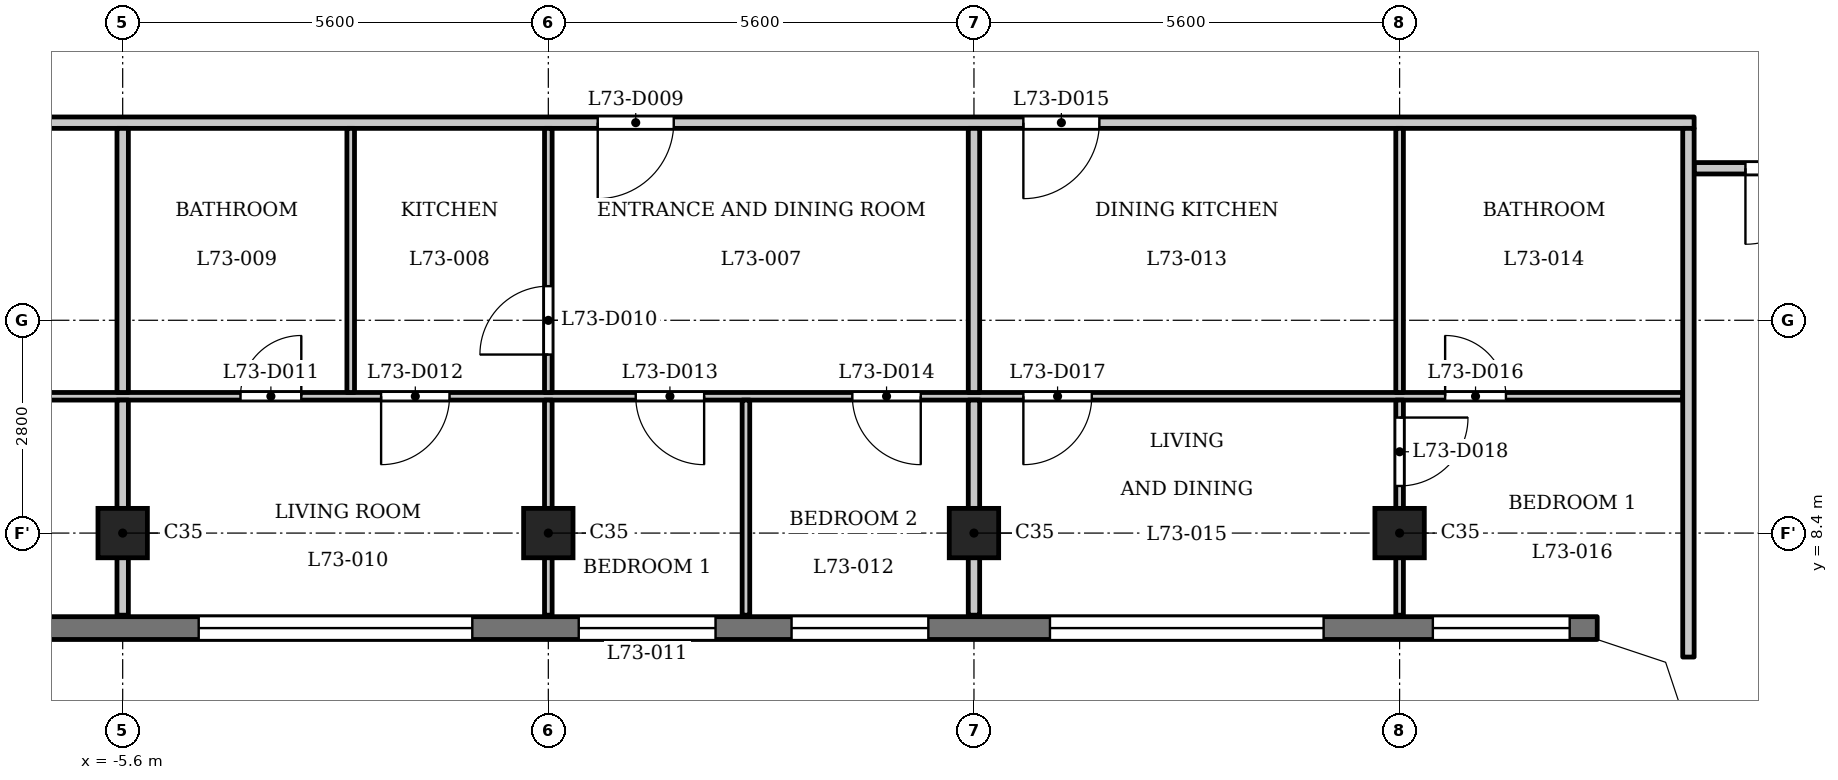
"""IFC4 building model, lengths in metres.
Left out: names, types, materials, properties, quantities, classifications, styles, units other than length and angle.
Written with IfcOpenShell. Run it as: python <this file> out.ifc"""

import sys

from ifc_helpers import new_model, si_unit, direction, frame, frame_2d, origin, origin_2d, place, context, subcontext, project, spatial, polyline, rectangle, outline, extrude, element, fill, save


model = new_model("IFC4")
c1 = context("Model", 3, precision=1e-05, world=origin(), true_north=direction((0.0, 1.0)))
c2 = subcontext(c1, "Body", "Model", "MODEL_VIEW")
j1 = project(units=[si_unit("LENGTHUNIT", "METRE"), si_unit("PLANEANGLEUNIT", "RADIAN")], contexts=[c1])
p1 = place(None, origin())
s1 = spatial("IfcSite", under=j1, at=p1, CompositionType="ELEMENT")
p2 = place(p1, origin())
s2 = spatial("IfcBuilding", under=s1, at=p2, CompositionType="ELEMENT")
p3 = place(p2, frame((0.0, 0.0, 280.2)))
s3 = spatial("IfcBuildingStorey", under=s2, at=p3, CompositionType="ELEMENT", Elevation=280.2)
for number, where, z_axis, x_axis in (
    (1, (-5.6, 8.4, 0.0), (0.0, 0.0, 1.0), (1.0, 0.0, 0.0)),
    (2, (0.0, 8.4, 0.0), (0.0, 0.0, 1.0), (1.0, 0.0, 0.0)),
    (3, (5.6, 8.4, 0.0), (0.0, 0.0, 1.0), (1.0, 0.0, 0.0)),
    (4, (11.2, 8.4, 0.0), (0.0, 0.0, 1.0), (1.0, 0.0, 0.0)),
):
    element("IfcColumn", number, at=place(p3, frame(where, z_axis=z_axis, x_axis=x_axis)), inside=s3, PredefinedType="COLUMN", context=c2, shape_type="SweptSolid", body=[
        extrude(rectangle(XDim=0.65, YDim=0.65, at=origin_2d()), origin(), (0.0, 0.0, 1.0), 3.5),
    ])
p4 = place(p3, frame((-13.8, 7.15, 0.0), z_axis=(0.0, 0.0, 1.0), x_axis=(1.0, 0.0, 0.0)))
e5 = element("IfcWall", 5, at=p4, inside=s3, PredefinedType="SOLIDWALL", context=c2, shape_type="SweptSolid", body=[
    extrude(rectangle(XDim=27.6, YDim=0.3, at=frame_2d((13.8, 0.0))), origin(), (0.0, 0.0, 1.0), 3.15),
])
p5 = place(p4, frame((0.363, 0.0, 0.9)))
e6 = element("IfcOpeningElement", 6, at=p5, cuts=e5, PredefinedType="OPENING", context=c2, shape_type="SweptSolid", body=[
    extrude(rectangle(XDim=1.8, YDim=1.25, at=frame_2d((0.9, 0.625))), frame((0.0, 0.16, 0.0), z_axis=(0.0, -1.0, 0.0), x_axis=(1.0, 0.0, 0.0)), (0.0, 0.0, 1.0), 0.32),
])
p6 = place(p4, frame((3.6, 0.0, 1.2)))
e7 = element("IfcOpeningElement", 7, at=p6, cuts=e5, PredefinedType="OPENING", context=c2, shape_type="SweptSolid", body=[
    extrude(rectangle(XDim=3.6, YDim=0.95, at=frame_2d((1.8, 0.475))), frame((0.0, 0.16, 0.0), z_axis=(0.0, -1.0, 0.0), x_axis=(1.0, 0.0, 0.0)), (0.0, 0.0, 1.0), 0.32),
])
p7 = place(p4, frame((9.2, 0.0, 1.2)))
e8 = element("IfcOpeningElement", 8, at=p7, cuts=e5, PredefinedType="OPENING", context=c2, shape_type="SweptSolid", body=[
    extrude(rectangle(XDim=3.6, YDim=0.95, at=frame_2d((1.8, 0.475))), frame((0.0, 0.16, 0.0), z_axis=(0.0, -1.0, 0.0), x_axis=(1.0, 0.0, 0.0)), (0.0, 0.0, 1.0), 0.32),
])
p8 = place(p4, frame((14.2, 0.0, 0.9)))
e9 = element("IfcOpeningElement", 9, at=p8, cuts=e5, PredefinedType="OPENING", context=c2, shape_type="SweptSolid", body=[
    extrude(rectangle(XDim=1.8, YDim=1.25, at=frame_2d((0.9, 0.625))), frame((0.0, 0.16, 0.0), z_axis=(0.0, -1.0, 0.0), x_axis=(1.0, 0.0, 0.0)), (0.0, 0.0, 1.0), 0.32),
])
p9 = place(p4, frame((17.0, 0.0, 0.9)))
e10 = element("IfcOpeningElement", 10, at=p9, cuts=e5, PredefinedType="OPENING", context=c2, shape_type="SweptSolid", body=[
    extrude(rectangle(XDim=1.8, YDim=1.25, at=frame_2d((0.9, 0.625))), frame((0.0, 0.16, 0.0), z_axis=(0.0, -1.0, 0.0), x_axis=(1.0, 0.0, 0.0)), (0.0, 0.0, 1.0), 0.32),
])
p10 = place(p4, frame((20.4, 0.0, 1.2)))
e11 = element("IfcOpeningElement", 11, at=p10, cuts=e5, PredefinedType="OPENING", context=c2, shape_type="SweptSolid", body=[
    extrude(rectangle(XDim=3.6, YDim=0.95, at=frame_2d((1.8, 0.475))), frame((0.0, 0.16, 0.0), z_axis=(0.0, -1.0, 0.0), x_axis=(1.0, 0.0, 0.0)), (0.0, 0.0, 1.0), 0.32),
])
p11 = place(p4, frame((25.438, 0.0, 0.9)))
e12 = element("IfcOpeningElement", 12, at=p11, cuts=e5, PredefinedType="OPENING", context=c2, shape_type="SweptSolid", body=[
    extrude(rectangle(XDim=1.8, YDim=1.25, at=frame_2d((0.9, 0.625))), frame((0.0, 0.16, 0.0), z_axis=(0.0, -1.0, 0.0), x_axis=(1.0, 0.0, 0.0)), (0.0, 0.0, 1.0), 0.32),
])
p12 = place(p3, frame((-14.925, 10.2, 0.0), z_axis=(0.0, 0.0, 1.0), x_axis=(1.0, 0.0, 0.0)))
e13 = element("IfcWall", 13, at=p12, inside=s3, PredefinedType="PARTITIONING", context=c2, shape_type="SweptSolid", body=[
    extrude(rectangle(XDim=29.85, YDim=0.1, at=frame_2d((14.925, 0.0))), origin(), (0.0, 0.0, 1.0), 3.15),
])
p13 = place(p12, frame((4.375, 0.0, 0.0)))
e14 = element("IfcOpeningElement", 14, at=p13, cuts=e13, PredefinedType="OPENING", context=c2, shape_type="SweptSolid", body=[
    extrude(rectangle(XDim=0.8, YDim=2.1, at=frame_2d((0.4, 1.05))), frame((0.0, 0.06, 0.0), z_axis=(0.0, -1.0, 0.0), x_axis=(1.0, 0.0, 0.0)), (0.0, 0.0, 1.0), 0.12),
])
p14 = place(p12, frame((0.576, 0.0, 0.0)))
e15 = element("IfcOpeningElement", 15, at=p14, cuts=e13, PredefinedType="OPENING", context=c2, shape_type="SweptSolid", body=[
    extrude(rectangle(XDim=0.9, YDim=2.1, at=frame_2d((0.45, 1.05))), frame((0.0, 0.06, 0.0), z_axis=(0.0, -1.0, 0.0), x_axis=(1.0, 0.0, 0.0)), (0.0, 0.0, 1.0), 0.12),
])
p15 = place(p12, frame((10.875, 0.0, 0.0)))
e16 = element("IfcOpeningElement", 16, at=p15, cuts=e13, PredefinedType="OPENING", context=c2, shape_type="SweptSolid", body=[
    extrude(rectangle(XDim=0.8, YDim=2.1, at=frame_2d((0.4, 1.05))), frame((0.0, 0.06, 0.0), z_axis=(0.0, -1.0, 0.0), x_axis=(1.0, 0.0, 0.0)), (0.0, 0.0, 1.0), 0.12),
])
p16 = place(p12, frame((12.725, 0.0, 0.0)))
e17 = element("IfcOpeningElement", 17, at=p16, cuts=e13, PredefinedType="OPENING", context=c2, shape_type="SweptSolid", body=[
    extrude(rectangle(XDim=0.9, YDim=2.1, at=frame_2d((0.45, 1.05))), frame((0.0, 0.06, 0.0), z_axis=(0.0, -1.0, 0.0), x_axis=(1.0, 0.0, 0.0)), (0.0, 0.0, 1.0), 0.12),
])
p17 = place(p12, frame((16.075, 0.0, 0.0)))
e18 = element("IfcOpeningElement", 18, at=p17, cuts=e13, PredefinedType="OPENING", context=c2, shape_type="SweptSolid", body=[
    extrude(rectangle(XDim=0.9, YDim=2.1, at=frame_2d((0.45, 1.05))), frame((0.0, 0.06, 0.0), z_axis=(0.0, -1.0, 0.0), x_axis=(1.0, 0.0, 0.0)), (0.0, 0.0, 1.0), 0.12),
])
p18 = place(p12, frame((18.925, 0.0, 0.0)))
e19 = element("IfcOpeningElement", 19, at=p18, cuts=e13, PredefinedType="OPENING", context=c2, shape_type="SweptSolid", body=[
    extrude(rectangle(XDim=0.9, YDim=2.1, at=frame_2d((0.45, 1.05))), frame((0.0, 0.06, 0.0), z_axis=(0.0, -1.0, 0.0), x_axis=(1.0, 0.0, 0.0)), (0.0, 0.0, 1.0), 0.12),
])
p19 = place(p12, frame((26.724, 0.0, 0.0)))
e20 = element("IfcOpeningElement", 20, at=p19, cuts=e13, PredefinedType="OPENING", context=c2, shape_type="SweptSolid", body=[
    extrude(rectangle(XDim=0.8, YDim=2.1, at=frame_2d((0.4, 1.05))), frame((0.0, 0.06, 0.0), z_axis=(0.0, -1.0, 0.0), x_axis=(1.0, 0.0, 0.0)), (0.0, 0.0, 1.0), 0.12),
])
p20 = place(p12, frame((21.175, 0.0, 0.0)))
e21 = element("IfcOpeningElement", 21, at=p20, cuts=e13, PredefinedType="OPENING", context=c2, shape_type="SweptSolid", body=[
    extrude(rectangle(XDim=0.9, YDim=2.1, at=frame_2d((0.45, 1.05))), frame((0.0, 0.06, 0.0), z_axis=(0.0, -1.0, 0.0), x_axis=(1.0, 0.0, 0.0)), (0.0, 0.0, 1.0), 0.12),
])
p21 = place(p3, frame((15.075, 13.2, 0.0), z_axis=(0.0, 0.0, 1.0), x_axis=(1.0, 0.0, 0.0)))
e22 = element("IfcWall", 22, at=p21, inside=s3, PredefinedType="PARTITIONING", context=c2, shape_type="SweptSolid", body=[
    extrude(rectangle(XDim=2.325, YDim=0.15, at=frame_2d((1.163, 0.0))), origin(), (0.0, 0.0, 1.0), 3.15),
])
p22 = place(p21, frame((0.675, 0.0, 0.0)))
e23 = element("IfcOpeningElement", 23, at=p22, cuts=e22, PredefinedType="OPENING", context=c2, shape_type="SweptSolid", body=[
    extrude(rectangle(XDim=1.0, YDim=2.1, at=frame_2d((0.5, 1.05))), frame((0.0, 0.085, 0.0), z_axis=(0.0, -1.0, 0.0), x_axis=(1.0, 0.0, 0.0)), (0.0, 0.0, 1.0), 0.17),
])
p23 = place(p3, frame((-15.075, 13.8, 0.0), z_axis=(0.0, 0.0, 1.0), x_axis=(1.0, 0.0, 0.0)))
e24 = element("IfcWall", 24, at=p23, inside=s3, PredefinedType="PARTITIONING", context=c2, shape_type="SweptSolid", body=[
    extrude(rectangle(XDim=30.15, YDim=0.15, at=frame_2d((15.075, 0.0))), origin(), (0.0, 0.0, 1.0), 3.15),
])
p24 = place(p23, frame((0.726, 0.0, 0.0)))
e25 = element("IfcOpeningElement", 25, at=p24, cuts=e24, PredefinedType="OPENING", context=c2, shape_type="SweptSolid", body=[
    extrude(rectangle(XDim=1.0, YDim=2.1, at=frame_2d((0.5, 1.05))), frame((0.0, 0.085, 0.0), z_axis=(0.0, -1.0, 0.0), x_axis=(1.0, 0.0, 0.0)), (0.0, 0.0, 1.0), 0.17),
])
p25 = place(p23, frame((15.725, 0.0, 0.0)))
e26 = element("IfcOpeningElement", 26, at=p25, cuts=e24, PredefinedType="OPENING", context=c2, shape_type="SweptSolid", body=[
    extrude(rectangle(XDim=1.0, YDim=2.1, at=frame_2d((0.5, 1.05))), frame((0.0, 0.085, 0.0), z_axis=(0.0, -1.0, 0.0), x_axis=(1.0, 0.0, 0.0)), (0.0, 0.0, 1.0), 0.17),
])
p26 = place(p23, frame((21.325, 0.0, 0.0)))
e27 = element("IfcOpeningElement", 27, at=p26, cuts=e24, PredefinedType="OPENING", context=c2, shape_type="SweptSolid", body=[
    extrude(rectangle(XDim=1.0, YDim=2.1, at=frame_2d((0.5, 1.05))), frame((0.0, 0.085, 0.0), z_axis=(0.0, -1.0, 0.0), x_axis=(1.0, 0.0, 0.0)), (0.0, 0.0, 1.0), 0.17),
])
p27 = place(p3, frame((-5.6, 7.32, 0.0), z_axis=(0.0, 0.0, 1.0), x_axis=(0.0, 1.0, 0.0)))
e28 = element("IfcWall", 28, at=p27, inside=s3, PredefinedType="PARTITIONING", context=c2, shape_type="SweptSolid", body=[
    extrude(rectangle(XDim=2.83, YDim=0.15, at=frame_2d((1.415, 0.0))), origin(), (0.0, 0.0, 1.0), 3.15),
])
p28 = place(p3, frame((-5.6, 10.25, 0.0), z_axis=(0.0, 0.0, 1.0), x_axis=(0.0, 1.0, 0.0)))
e29 = element("IfcWall", 29, at=p28, inside=s3, PredefinedType="PARTITIONING", context=c2, shape_type="SweptSolid", body=[
    extrude(rectangle(XDim=3.475, YDim=0.15, at=frame_2d((1.738, 0.0))), origin(), (0.0, 0.0, 1.0), 3.15),
])
p29 = place(p3, frame((-2.6, 10.25, 0.0), z_axis=(0.0, 0.0, 1.0), x_axis=(0.0, 1.0, 0.0)))
e30 = element("IfcWall", 30, at=p29, inside=s3, PredefinedType="PARTITIONING", context=c2, shape_type="SweptSolid", body=[
    extrude(rectangle(XDim=3.475, YDim=0.1, at=frame_2d((1.738, 0.0))), origin(), (0.0, 0.0, 1.0), 3.15),
])
p30 = place(p3, frame((0.0, 7.32, 0.0), z_axis=(0.0, 0.0, 1.0), x_axis=(0.0, 1.0, 0.0)))
e31 = element("IfcWall", 31, at=p30, inside=s3, PredefinedType="PARTITIONING", context=c2, shape_type="SweptSolid", body=[
    extrude(rectangle(XDim=2.83, YDim=0.1, at=frame_2d((1.415, 0.0))), origin(), (0.0, 0.0, 1.0), 3.15),
])
p31 = place(p3, frame((0.0, 10.25, 0.0), z_axis=(0.0, 0.0, 1.0), x_axis=(0.0, 1.0, 0.0)))
e32 = element("IfcWall", 32, at=p31, inside=s3, PredefinedType="PARTITIONING", context=c2, shape_type="SweptSolid", body=[
    extrude(rectangle(XDim=3.475, YDim=0.1, at=frame_2d((1.738, 0.0))), origin(), (0.0, 0.0, 1.0), 3.15),
])
p32 = place(p31, frame((0.499, 0.0, 0.0)))
e33 = element("IfcOpeningElement", 33, at=p32, cuts=e32, PredefinedType="OPENING", context=c2, shape_type="SweptSolid", body=[
    extrude(rectangle(XDim=0.9, YDim=2.1, at=frame_2d((0.45, 1.05))), frame((0.0, 0.06, 0.0), z_axis=(0.0, -1.0, 0.0), x_axis=(1.0, 0.0, 0.0)), (0.0, 0.0, 1.0), 0.12),
])
p33 = place(p3, frame((2.6, 7.32, 0.0), z_axis=(0.0, 0.0, 1.0), x_axis=(0.0, 1.0, 0.0)))
e34 = element("IfcWall", 34, at=p33, inside=s3, PredefinedType="PARTITIONING", context=c2, shape_type="SweptSolid", body=[
    extrude(rectangle(XDim=2.83, YDim=0.1, at=frame_2d((1.415, 0.0))), origin(), (0.0, 0.0, 1.0), 3.15),
])
p34 = place(p3, frame((5.6, 7.32, 0.0), z_axis=(0.0, 0.0, 1.0), x_axis=(0.0, 1.0, 0.0)))
e35 = element("IfcWall", 35, at=p34, inside=s3, PredefinedType="PARTITIONING", context=c2, shape_type="SweptSolid", body=[
    extrude(rectangle(XDim=2.83, YDim=0.15, at=frame_2d((1.415, 0.0))), origin(), (0.0, 0.0, 1.0), 3.15),
])
p35 = place(p3, frame((5.6, 10.25, 0.0), z_axis=(0.0, 0.0, 1.0), x_axis=(0.0, 1.0, 0.0)))
e36 = element("IfcWall", 36, at=p35, inside=s3, PredefinedType="PARTITIONING", context=c2, shape_type="SweptSolid", body=[
    extrude(rectangle(XDim=3.475, YDim=0.15, at=frame_2d((1.738, 0.0))), origin(), (0.0, 0.0, 1.0), 3.15),
])
p36 = place(p3, frame((11.2, 7.32, 0.0), z_axis=(0.0, 0.0, 1.0), x_axis=(0.0, 1.0, 0.0)))
e37 = element("IfcWall", 37, at=p36, inside=s3, PredefinedType="PARTITIONING", context=c2, shape_type="SweptSolid", body=[
    extrude(rectangle(XDim=2.83, YDim=0.1, at=frame_2d((1.415, 0.0))), origin(), (0.0, 0.0, 1.0), 3.15),
])
p37 = place(p36, frame((1.7, 0.0, 0.0)))
e38 = element("IfcOpeningElement", 38, at=p37, cuts=e37, PredefinedType="OPENING", context=c2, shape_type="SweptSolid", body=[
    extrude(rectangle(XDim=0.9, YDim=2.1, at=frame_2d((0.45, 1.05))), frame((0.0, 0.06, 0.0), z_axis=(0.0, -1.0, 0.0), x_axis=(1.0, 0.0, 0.0)), (0.0, 0.0, 1.0), 0.12),
])
p38 = place(p3, frame((11.2, 10.25, 0.0), z_axis=(0.0, 0.0, 1.0), x_axis=(0.0, 1.0, 0.0)))
e39 = element("IfcWall", 39, at=p38, inside=s3, PredefinedType="PARTITIONING", context=c2, shape_type="SweptSolid", body=[
    extrude(rectangle(XDim=3.475, YDim=0.1, at=frame_2d((1.738, 0.0))), origin(), (0.0, 0.0, 1.0), 3.15),
])
p39 = place(p3, frame((15.0, 6.769, 0.0), z_axis=(0.0, 0.0, 1.0), x_axis=(0.0, 1.0, 0.0)))
e40 = element("IfcWall", 40, at=p39, inside=s3, PredefinedType="PARTITIONING", context=c2, shape_type="SweptSolid", body=[
    extrude(rectangle(XDim=6.956, YDim=0.15, at=frame_2d((3.478, 0.0))), origin(), (0.0, 0.0, 1.0), 3.15),
])
p40 = place(p3, origin())
e41 = element("IfcWall", 41, at=p40, inside=s3, PredefinedType="SOLIDWALL", context=c2, shape_type="SweptSolid", body=[
    extrude(outline(polyline([(14.937, 6.937), (13.849, 7.3), (13.8, 7.3), (13.8, 7.0), (14.7, 6.7), (15.0, 5.8), (15.3, 5.8), (15.3, 5.849), (14.937, 6.937)])), origin(), (0.0, 0.0, 1.0), 3.15),
])
p41 = place(p22, origin())
e42 = element("IfcDoor", 42, at=p41, inside=s3, OperationType="SINGLE_SWING_LEFT", PredefinedType="DOOR", context=c2, shape_type="SweptSolid", body=[
    extrude(rectangle(XDim=1.0, YDim=2.1, at=frame_2d((0.5, 1.05))), frame((0.0, 0.025, 0.0), z_axis=(0.0, -1.0, 0.0), x_axis=(1.0, 0.0, 0.0)), (0.0, 0.0, 1.0), 0.05),
])
fill(e23, e42)
p42 = place(p25, origin())
e43 = element("IfcDoor", 43, at=p42, inside=s3, OperationType="SINGLE_SWING_LEFT", PredefinedType="DOOR", context=c2, shape_type="SweptSolid", body=[
    extrude(rectangle(XDim=1.0, YDim=2.1, at=frame_2d((0.5, 1.05))), frame((0.0, 0.025, 0.0), z_axis=(0.0, -1.0, 0.0), x_axis=(1.0, 0.0, 0.0)), (0.0, 0.0, 1.0), 0.05),
])
fill(e26, e43)
p43 = place(p32, origin())
e44 = element("IfcDoor", 44, at=p43, inside=s3, OperationType="SINGLE_SWING_RIGHT", PredefinedType="DOOR", context=c2, shape_type="SweptSolid", body=[
    extrude(rectangle(XDim=0.9, YDim=2.1, at=frame_2d((0.45, 1.05))), frame((0.0, 0.025, 0.0), z_axis=(0.0, -1.0, 0.0), x_axis=(1.0, 0.0, 0.0)), (0.0, 0.0, 1.0), 0.05),
])
fill(e33, e44)
p44 = place(p15, origin())
e45 = element("IfcDoor", 45, at=p44, inside=s3, OperationType="SINGLE_SWING_LEFT", PredefinedType="DOOR", context=c2, shape_type="SweptSolid", body=[
    extrude(rectangle(XDim=0.8, YDim=2.1, at=frame_2d((0.4, 1.05))), frame((0.0, 0.025, 0.0), z_axis=(0.0, -1.0, 0.0), x_axis=(1.0, 0.0, 0.0)), (0.0, 0.0, 1.0), 0.05),
])
fill(e16, e45)
p45 = place(p16, origin())
e46 = element("IfcDoor", 46, at=p45, inside=s3, OperationType="SINGLE_SWING_LEFT", PredefinedType="DOOR", context=c2, shape_type="SweptSolid", body=[
    extrude(rectangle(XDim=0.9, YDim=2.1, at=frame_2d((0.45, 1.05))), frame((0.0, 0.025, 0.0), z_axis=(0.0, -1.0, 0.0), x_axis=(1.0, 0.0, 0.0)), (0.0, 0.0, 1.0), 0.05),
])
fill(e17, e46)
p46 = place(p17, origin())
e47 = element("IfcDoor", 47, at=p46, inside=s3, OperationType="SINGLE_SWING_RIGHT", PredefinedType="DOOR", context=c2, shape_type="SweptSolid", body=[
    extrude(rectangle(XDim=0.9, YDim=2.1, at=frame_2d((0.45, 1.05))), frame((0.0, 0.025, 0.0), z_axis=(0.0, -1.0, 0.0), x_axis=(1.0, 0.0, 0.0)), (0.0, 0.0, 1.0), 0.05),
])
fill(e18, e47)
p47 = place(p18, origin())
e48 = element("IfcDoor", 48, at=p47, inside=s3, OperationType="SINGLE_SWING_RIGHT", PredefinedType="DOOR", context=c2, shape_type="SweptSolid", body=[
    extrude(rectangle(XDim=0.9, YDim=2.1, at=frame_2d((0.45, 1.05))), frame((0.0, 0.025, 0.0), z_axis=(0.0, -1.0, 0.0), x_axis=(1.0, 0.0, 0.0)), (0.0, 0.0, 1.0), 0.05),
])
fill(e19, e48)
p48 = place(p26, origin())
e49 = element("IfcDoor", 49, at=p48, inside=s3, OperationType="SINGLE_SWING_LEFT", PredefinedType="DOOR", context=c2, shape_type="SweptSolid", body=[
    extrude(rectangle(XDim=1.0, YDim=2.1, at=frame_2d((0.5, 1.05))), frame((0.0, 0.025, 0.0), z_axis=(0.0, -1.0, 0.0), x_axis=(1.0, 0.0, 0.0)), (0.0, 0.0, 1.0), 0.05),
])
fill(e27, e49)
p49 = place(p19, origin())
e50 = element("IfcDoor", 50, at=p49, inside=s3, OperationType="SINGLE_SWING_RIGHT", PredefinedType="DOOR", context=c2, shape_type="SweptSolid", body=[
    extrude(rectangle(XDim=0.8, YDim=2.1, at=frame_2d((0.4, 1.05))), frame((0.0, 0.025, 0.0), z_axis=(0.0, -1.0, 0.0), x_axis=(1.0, 0.0, 0.0)), (0.0, 0.0, 1.0), 0.05),
])
fill(e20, e50)
p50 = place(p20, origin())
e51 = element("IfcDoor", 51, at=p50, inside=s3, OperationType="SINGLE_SWING_LEFT", PredefinedType="DOOR", context=c2, shape_type="SweptSolid", body=[
    extrude(rectangle(XDim=0.9, YDim=2.1, at=frame_2d((0.45, 1.05))), frame((0.0, 0.025, 0.0), z_axis=(0.0, -1.0, 0.0), x_axis=(1.0, 0.0, 0.0)), (0.0, 0.0, 1.0), 0.05),
])
fill(e21, e51)
p51 = place(p37, origin())
e52 = element("IfcDoor", 52, at=p51, inside=s3, OperationType="SINGLE_SWING_RIGHT", PredefinedType="DOOR", context=c2, shape_type="SweptSolid", body=[
    extrude(rectangle(XDim=0.9, YDim=2.1, at=frame_2d((0.45, 1.05))), frame((0.0, 0.025, 0.0), z_axis=(0.0, -1.0, 0.0), x_axis=(1.0, 0.0, 0.0)), (0.0, 0.0, 1.0), 0.05),
])
fill(e38, e52)
p52 = place(p7, origin())
e53 = element("IfcWindow", 53, at=p52, inside=s3, PartitioningType="SINGLE_PANEL", PredefinedType="WINDOW", context=c2, shape_type="SweptSolid", body=[
    extrude(rectangle(XDim=3.6, YDim=0.95, at=frame_2d((1.8, 0.475))), frame((0.0, 0.03, 0.0), z_axis=(0.0, -1.0, 0.0), x_axis=(1.0, 0.0, 0.0)), (0.0, 0.0, 1.0), 0.06),
])
fill(e8, e53)
p53 = place(p8, origin())
e54 = element("IfcWindow", 54, at=p53, inside=s3, PartitioningType="SINGLE_PANEL", PredefinedType="WINDOW", context=c2, shape_type="SweptSolid", body=[
    extrude(rectangle(XDim=1.8, YDim=1.25, at=frame_2d((0.9, 0.625))), frame((0.0, 0.03, 0.0), z_axis=(0.0, -1.0, 0.0), x_axis=(1.0, 0.0, 0.0)), (0.0, 0.0, 1.0), 0.06),
])
fill(e9, e54)
p54 = place(p9, origin())
e55 = element("IfcWindow", 55, at=p54, inside=s3, PartitioningType="SINGLE_PANEL", PredefinedType="WINDOW", context=c2, shape_type="SweptSolid", body=[
    extrude(rectangle(XDim=1.8, YDim=1.25, at=frame_2d((0.9, 0.625))), frame((0.0, 0.03, 0.0), z_axis=(0.0, -1.0, 0.0), x_axis=(1.0, 0.0, 0.0)), (0.0, 0.0, 1.0), 0.06),
])
fill(e10, e55)
p55 = place(p10, origin())
e56 = element("IfcWindow", 56, at=p55, inside=s3, PartitioningType="SINGLE_PANEL", PredefinedType="WINDOW", context=c2, shape_type="SweptSolid", body=[
    extrude(rectangle(XDim=3.6, YDim=0.95, at=frame_2d((1.8, 0.475))), frame((0.0, 0.03, 0.0), z_axis=(0.0, -1.0, 0.0), x_axis=(1.0, 0.0, 0.0)), (0.0, 0.0, 1.0), 0.06),
])
fill(e11, e56)
p56 = place(p11, origin())
e57 = element("IfcWindow", 57, at=p56, inside=s3, PartitioningType="SINGLE_PANEL", PredefinedType="WINDOW", context=c2, shape_type="SweptSolid", body=[
    extrude(rectangle(XDim=1.8, YDim=1.25, at=frame_2d((0.9, 0.625))), frame((0.0, 0.03, 0.0), z_axis=(0.0, -1.0, 0.0), x_axis=(1.0, 0.0, 0.0)), (0.0, 0.0, 1.0), 0.06),
])
fill(e12, e57)
save(model, sys.argv[1])
